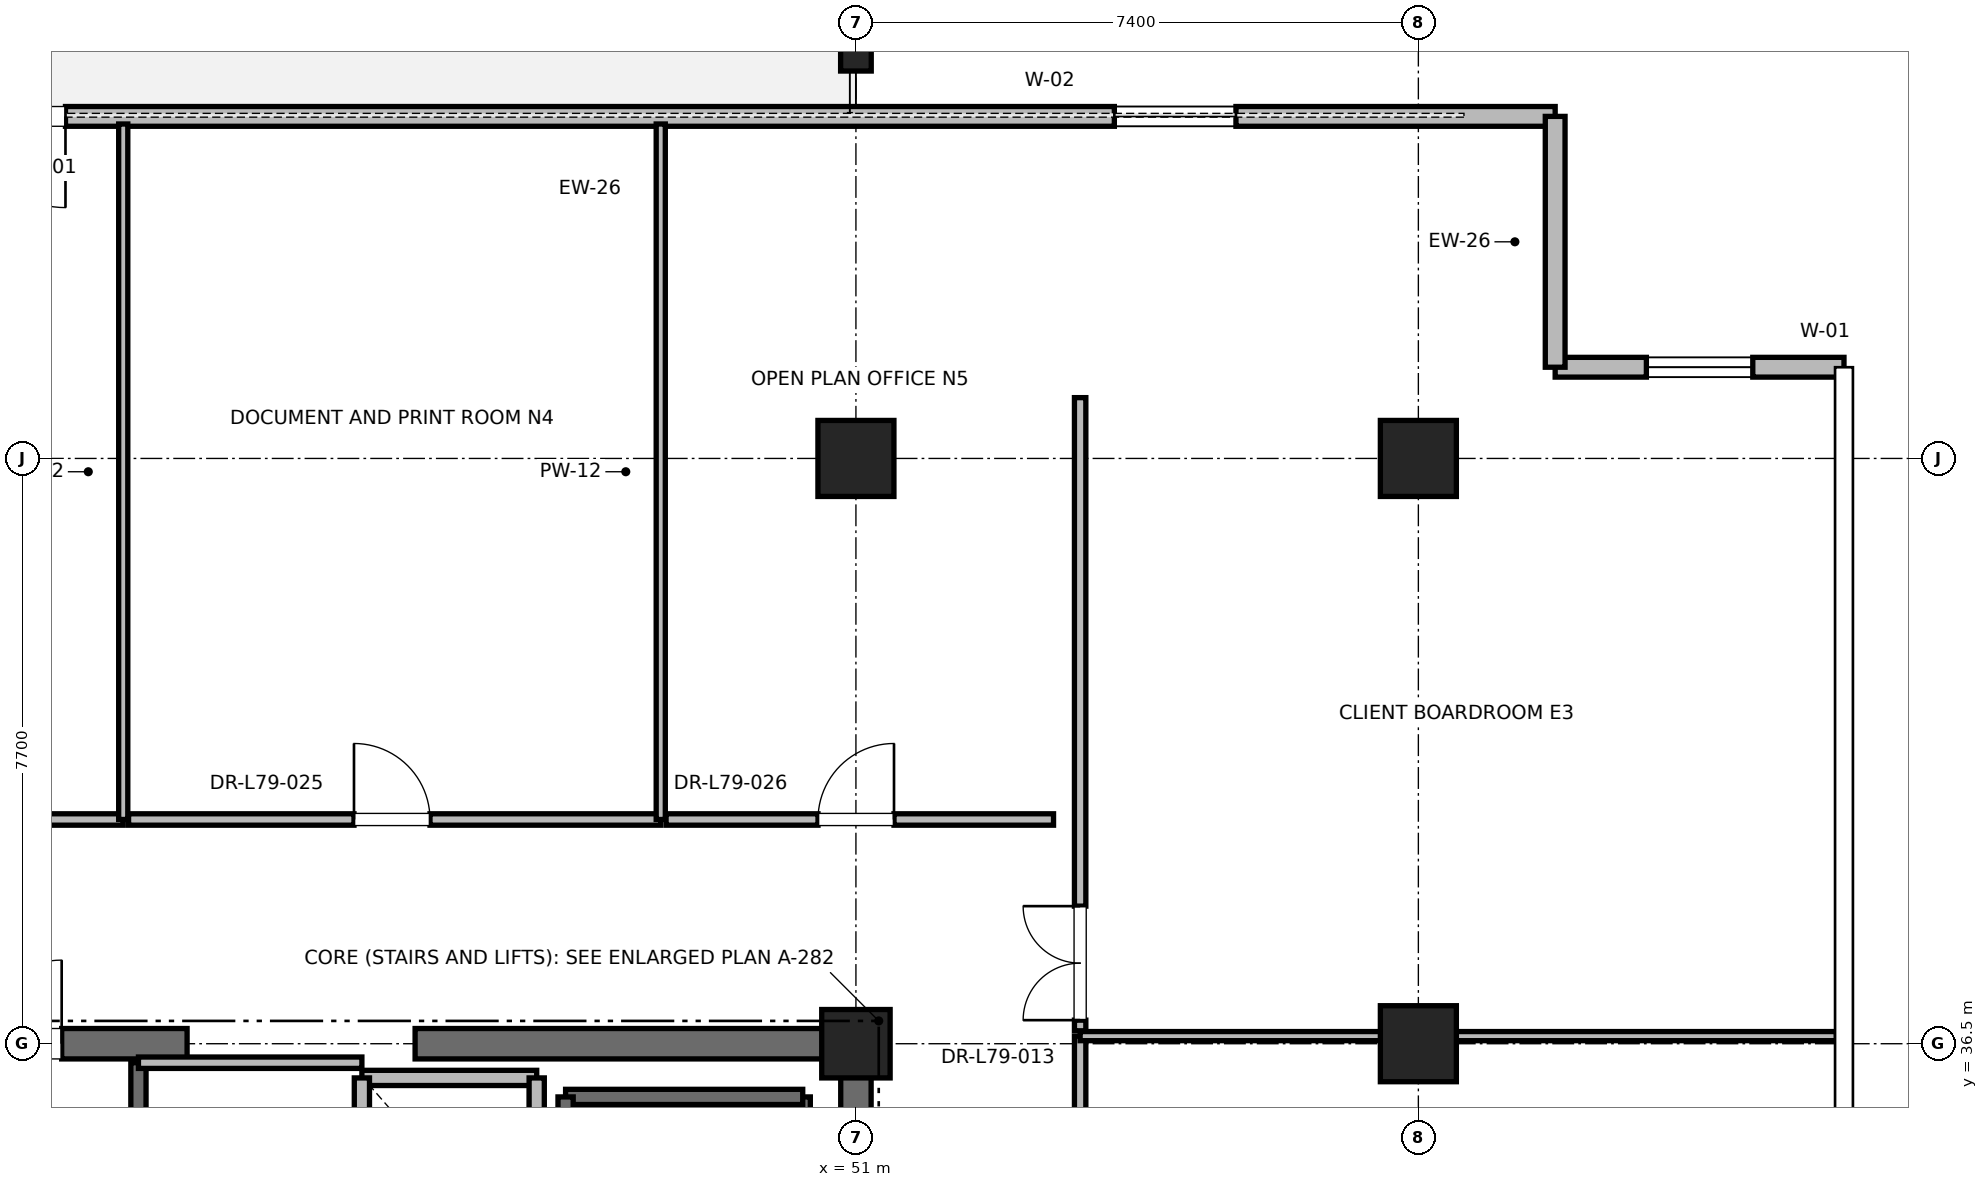
"""IFC4 building model, lengths in metres.
Left out: names, types, materials, properties, quantities, classifications, styles, units other than length and angle.
Written with IfcOpenShell. Run it as: python <this file> out.ifc"""

import sys

from ifc_helpers import new_model, si_unit, direction, frame, frame_2d, origin, origin_2d, place, context, subcontext, project, spatial, rectangle, i_section, extrude, element, fill, save


model = new_model("IFC4")
c1 = context("Model", 3, precision=1e-05, world=origin(), true_north=direction((0.0, 1.0)))
c2 = subcontext(c1, "Body", "Model", "MODEL_VIEW")
j1 = project(units=[si_unit("LENGTHUNIT", "METRE"), si_unit("PLANEANGLEUNIT", "RADIAN")], contexts=[c1])
p1 = place(None, origin())
s1 = spatial("IfcSite", under=j1, at=p1, CompositionType="ELEMENT")
p2 = place(p1, origin())
s2 = spatial("IfcBuilding", under=s1, at=p2, CompositionType="ELEMENT")
p3 = place(p2, frame((0.0, 0.0, 338.8)))
s3 = spatial("IfcBuildingStorey", under=s2, at=p3, CompositionType="ELEMENT", Elevation=338.8)
for number, where, z_axis, x_axis in (
    (1, (51.0, 44.2, 0.0), (0.0, 0.0, 1.0), (1.0, 0.0, 0.0)),
    (2, (58.4, 36.5, 0.0), (0.0, 0.0, 1.0), (1.0, 0.0, 0.0)),
    (3, (58.4, 44.2, 0.0), (0.0, 0.0, 1.0), (1.0, 0.0, 0.0)),
):
    element("IfcColumn", number, at=place(p3, frame(where, z_axis=z_axis, x_axis=x_axis)), inside=s3, PredefinedType="COLUMN", context=c2, shape_type="SweptSolid", body=[
        extrude(rectangle(XDim=1.0, YDim=1.0, at=origin_2d()), origin(), (0.0, 0.0, 1.0), 4.0),
    ])
p4 = place(p3, frame((51.0, 49.5, 0.0), z_axis=(0.0, 0.0, 1.0), x_axis=(1.0, 0.0, 0.0)))
e4 = element("IfcColumn", 4, at=p4, inside=s3, PredefinedType="COLUMN", context=c2, shape_type="SweptSolid", body=[
    extrude(i_section(OverallWidth=0.403, OverallDepth=0.406, WebThickness=0.027, FlangeThickness=0.043, FilletRadius=0.015, at=origin_2d()), origin(), (0.0, 0.0, 1.0), 4.0),
])
p5 = place(p3, frame((51.0, 36.5, 0.0), z_axis=(0.0, 0.0, 1.0), x_axis=(1.0, 0.0, 0.0)))
e5 = element("IfcColumn", 5, at=p5, inside=s3, PredefinedType="PILASTER", context=c2, shape_type="SweptSolid", body=[
    extrude(rectangle(XDim=0.9, YDim=0.9, at=origin_2d()), origin(), (0.0, 0.0, 1.0), 4.0),
])
p6 = place(p3, frame((37.8, 36.5, 0.0), z_axis=(0.0, 0.0, 1.0), x_axis=(1.0, 0.0, 0.0)))
e6 = element("IfcWall", 6, at=p6, inside=s3, PredefinedType="SHEAR", context=c2, shape_type="SweptSolid", body=[
    extrude(rectangle(XDim=4.4, YDim=0.4, at=frame_2d((2.2, 0.0))), origin(), (0.0, 0.0, 1.0), 3.7),
])
p7 = place(p6, frame((1.65, 0.0, 0.0)))
e7 = element("IfcOpeningElement", 7, at=p7, cuts=e6, PredefinedType="OPENING", context=c2, shape_type="SweptSolid", body=[
    extrude(rectangle(XDim=1.1, YDim=2.15, at=frame_2d((0.55, 1.075))), frame((0.0, 0.2, 0.0), z_axis=(0.0, -1.0, 0.0), x_axis=(1.0, 0.0, 0.0)), (0.0, 0.0, 1.0), 0.4),
])
p8 = place(p3, frame((45.2, 36.5, 0.0), z_axis=(0.0, 0.0, 1.0), x_axis=(1.0, 0.0, 0.0)))
e8 = element("IfcWall", 8, at=p8, inside=s3, PredefinedType="SHEAR", context=c2, shape_type="SweptSolid", body=[
    extrude(rectangle(XDim=5.8, YDim=0.4, at=frame_2d((2.9, 0.0))), origin(), (0.0, 0.0, 1.0), 3.7),
])
p9 = place(p3, frame((51.0, 27.7, 0.0), z_axis=(0.0, 0.0, 1.0), x_axis=(0.0, 1.0, 0.0)))
e9 = element("IfcWall", 9, at=p9, inside=s3, PredefinedType="SHEAR", context=c2, shape_type="SweptSolid", body=[
    extrude(rectangle(XDim=8.8, YDim=0.4, at=frame_2d((4.4, 0.0))), origin(), (0.0, 0.0, 1.0), 3.7),
])
p10 = place(p3, frame((60.2, 48.7, 0.0), z_axis=(0.0, 0.0, 1.0), x_axis=(-1.0, 0.0, 0.0)))
e10 = element("IfcWall", 10, at=p10, inside=s3, PredefinedType="PARAPET", context=c2, shape_type="SweptSolid", body=[
    extrude(rectangle(XDim=40.4, YDim=0.26, at=frame_2d((20.2, 0.0))), origin(), (0.0, 0.0, 1.0), 3.7),
])
p11 = place(p10, frame((4.2, 0.0, 0.85)))
e11 = element("IfcOpeningElement", 11, at=p11, cuts=e10, PredefinedType="OPENING", context=c2, shape_type="SweptSolid", body=[
    extrude(rectangle(XDim=1.6, YDim=2.1, at=frame_2d((0.8, 1.05))), frame((0.0, 0.13, 0.0), z_axis=(0.0, -1.0, 0.0), x_axis=(1.0, 0.0, 0.0)), (0.0, 0.0, 1.0), 0.26),
])
p12 = place(p10, frame((19.6, 0.0, 0.0)))
e12 = element("IfcOpeningElement", 12, at=p12, cuts=e10, PredefinedType="OPENING", context=c2, shape_type="SweptSolid", body=[
    extrude(rectangle(XDim=1.2, YDim=2.2, at=frame_2d((0.6, 1.1))), frame((0.0, 0.13, 0.0), z_axis=(0.0, -1.0, 0.0), x_axis=(1.0, 0.0, 0.0)), (0.0, 0.0, 1.0), 0.26),
])
p13 = place(p10, frame((34.6, 0.0, 0.85)))
e13 = element("IfcOpeningElement", 13, at=p13, cuts=e10, PredefinedType="OPENING", context=c2, shape_type="SweptSolid", body=[
    extrude(rectangle(XDim=1.6, YDim=2.1, at=frame_2d((0.8, 1.05))), frame((0.0, 0.13, 0.0), z_axis=(0.0, -1.0, 0.0), x_axis=(1.0, 0.0, 0.0)), (0.0, 0.0, 1.0), 0.26),
])
p14 = place(p3, frame((64.0, 45.4, 0.0), z_axis=(0.0, 0.0, 1.0), x_axis=(-1.0, 0.0, 0.0)))
e14 = element("IfcWall", 14, at=p14, inside=s3, PredefinedType="PARAPET", context=c2, shape_type="SweptSolid", body=[
    extrude(rectangle(XDim=3.8, YDim=0.26, at=frame_2d((1.9, 0.0))), origin(), (0.0, 0.0, 1.0), 3.7),
])
p15 = place(p14, frame((1.2, 0.0, 0.85)))
e15 = element("IfcOpeningElement", 15, at=p15, cuts=e14, PredefinedType="OPENING", context=c2, shape_type="SweptSolid", body=[
    extrude(rectangle(XDim=1.4, YDim=2.0, at=frame_2d((0.7, 1.0))), frame((0.0, 0.13, 0.0), z_axis=(0.0, -1.0, 0.0), x_axis=(1.0, 0.0, 0.0)), (0.0, 0.0, 1.0), 0.26),
])
p16 = place(p3, frame((60.2, 45.4, 0.0), z_axis=(0.0, 0.0, 1.0), x_axis=(0.0, 1.0, 0.0)))
e16 = element("IfcWall", 16, at=p16, inside=s3, PredefinedType="PARAPET", context=c2, shape_type="SweptSolid", body=[
    extrude(rectangle(XDim=3.3, YDim=0.26, at=frame_2d((1.65, 0.0))), origin(), (0.0, 0.0, 1.0), 3.7),
])
p17 = place(p3, frame((50.3, 27.65, 0.0), z_axis=(0.0, 0.0, 1.0), x_axis=(0.0, 1.0, 0.0)))
e17 = element("IfcWall", 17, at=p17, inside=s3, PredefinedType="SOLIDWALL", context=c2, shape_type="SweptSolid", body=[
    extrude(rectangle(XDim=8.15, YDim=0.2, at=frame_2d((4.075, 0.0))), origin(), (0.0, 0.0, 1.0), 3.7),
])
p18 = place(p3, frame((47.18, 35.8, 0.0), z_axis=(0.0, 0.0, 1.0), x_axis=(1.0, 0.0, 0.0)))
e18 = element("IfcWall", 18, at=p18, inside=s3, PredefinedType="SOLIDWALL", context=c2, shape_type="SweptSolid", body=[
    extrude(rectangle(XDim=3.12, YDim=0.2, at=frame_2d((1.56, 0.0))), origin(), (0.0, 0.0, 1.0), 3.7),
])
p19 = place(p3, frame((47.18, 27.62, 0.0), z_axis=(0.0, 0.0, 1.0), x_axis=(0.0, 1.0, 0.0)))
e19 = element("IfcWall", 19, at=p19, inside=s3, PredefinedType="SOLIDWALL", context=c2, shape_type="SweptSolid", body=[
    extrude(rectangle(XDim=8.18, YDim=0.2, at=frame_2d((4.09, 0.0))), origin(), (0.0, 0.0, 1.0), 3.7),
])
p20 = place(p3, frame((41.56, 27.68, 0.0), z_axis=(0.0, 0.0, 1.0), x_axis=(0.0, 1.0, 0.0)))
e20 = element("IfcWall", 20, at=p20, inside=s3, PredefinedType="SOLIDWALL", context=c2, shape_type="SweptSolid", body=[
    extrude(rectangle(XDim=8.57, YDim=0.2, at=frame_2d((4.285, 0.0))), origin(), (0.0, 0.0, 1.0), 3.7),
])
p21 = place(p3, frame((46.8, 36.05, 0.0), z_axis=(0.0, 0.0, 1.0), x_axis=(-1.0, 0.0, 0.0)))
e21 = element("IfcWall", 21, at=p21, inside=s3, PredefinedType="SOLIDWALL", context=c2, shape_type="SweptSolid", body=[
    extrude(rectangle(XDim=2.3, YDim=0.2, at=frame_2d((1.15, 0.0))), origin(), (0.0, 0.0, 1.0), 2.78),
])
p22 = place(p3, frame((44.5, 36.05, 0.0), z_axis=(0.0, 0.0, 1.0), x_axis=(0.0, -1.0, 0.0)))
e22 = element("IfcWall", 22, at=p22, inside=s3, PredefinedType="SOLIDWALL", context=c2, shape_type="SweptSolid", body=[
    extrude(rectangle(XDim=2.6, YDim=0.2, at=frame_2d((1.3, 0.0))), origin(), (0.0, 0.0, 1.0), 2.78),
])
p23 = place(p3, frame((46.8, 33.45, 0.0), z_axis=(0.0, 0.0, 1.0), x_axis=(0.0, 1.0, 0.0)))
e23 = element("IfcWall", 23, at=p23, inside=s3, PredefinedType="SOLIDWALL", context=c2, shape_type="SweptSolid", body=[
    extrude(rectangle(XDim=2.6, YDim=0.2, at=frame_2d((1.3, 0.0))), origin(), (0.0, 0.0, 1.0), 3.7),
])
p24 = place(p3, frame((41.56, 36.25, 0.0), z_axis=(0.0, 0.0, 1.0), x_axis=(1.0, 0.0, 0.0)))
e24 = element("IfcWall", 24, at=p24, inside=s3, PredefinedType="PARTITIONING", context=c2, shape_type="SweptSolid", body=[
    extrude(rectangle(XDim=2.94, YDim=0.15, at=frame_2d((1.47, 0.0))), origin(), (0.0, 0.0, 1.0), 2.78),
])
p25 = place(p3, frame((35.174, 39.45, 0.0), z_axis=(0.0, 0.0, 1.0), x_axis=(1.0, 0.0, 0.0)))
e25 = element("IfcWall", 25, at=p25, inside=s3, PredefinedType="PARTITIONING", context=c2, shape_type="SweptSolid", body=[
    extrude(rectangle(XDim=6.186, YDim=0.15, at=frame_2d((3.093, 0.0))), origin(), (0.0, 0.0, 1.0), 2.85),
])
p26 = place(p25, frame((2.558, 0.0, 0.0)))
e26 = element("IfcOpeningElement", 26, at=p26, cuts=e25, PredefinedType="OPENING", context=c2, shape_type="SweptSolid", body=[
    extrude(rectangle(XDim=1.0, YDim=2.15, at=frame_2d((0.5, 1.075))), frame((0.0, 0.075, 0.0), z_axis=(0.0, -1.0, 0.0), x_axis=(1.0, 0.0, 0.0)), (0.0, 0.0, 1.0), 0.15),
])
p27 = place(p3, frame((41.36, 39.45, 0.0), z_axis=(0.0, 0.0, 1.0), x_axis=(0.0, 1.0, 0.0)))
e27 = element("IfcWall", 27, at=p27, inside=s3, PredefinedType="PARTITIONING", context=c2, shape_type="SweptSolid", body=[
    extrude(rectangle(XDim=9.15, YDim=0.12, at=frame_2d((4.575, 0.0))), origin(), (0.0, 0.0, 1.0), 2.33),
])
p28 = place(p3, frame((41.43, 39.45, 0.0), z_axis=(0.0, 0.0, 1.0), x_axis=(1.0, 0.0, 0.0)))
e28 = element("IfcWall", 28, at=p28, inside=s3, PredefinedType="PARTITIONING", context=c2, shape_type="SweptSolid", body=[
    extrude(rectangle(XDim=7.002, YDim=0.15, at=frame_2d((3.501, 0.0))), origin(), (0.0, 0.0, 1.0), 2.85),
])
p29 = place(p28, frame((2.966, 0.0, 0.0)))
e29 = element("IfcOpeningElement", 29, at=p29, cuts=e28, PredefinedType="OPENING", context=c2, shape_type="SweptSolid", body=[
    extrude(rectangle(XDim=1.0, YDim=2.15, at=frame_2d((0.5, 1.075))), frame((0.0, 0.075, 0.0), z_axis=(0.0, -1.0, 0.0), x_axis=(1.0, 0.0, 0.0)), (0.0, 0.0, 1.0), 0.15),
])
p30 = place(p3, frame((48.432, 39.45, 0.0), z_axis=(0.0, 0.0, 1.0), x_axis=(0.0, 1.0, 0.0)))
e30 = element("IfcWall", 30, at=p30, inside=s3, PredefinedType="PARTITIONING", context=c2, shape_type="SweptSolid", body=[
    extrude(rectangle(XDim=9.15, YDim=0.12, at=frame_2d((4.575, 0.0))), origin(), (0.0, 0.0, 1.0), 2.33),
])
p31 = place(p3, frame((48.502, 39.45, 0.0), z_axis=(0.0, 0.0, 1.0), x_axis=(1.0, 0.0, 0.0)))
e31 = element("IfcWall", 31, at=p31, inside=s3, PredefinedType="PARTITIONING", context=c2, shape_type="SweptSolid", body=[
    extrude(rectangle(XDim=5.098, YDim=0.15, at=frame_2d((2.549, 0.0))), origin(), (0.0, 0.0, 1.0), 2.753),
])
p32 = place(p31, frame((1.999, 0.0, 0.0)))
e32 = element("IfcOpeningElement", 32, at=p32, cuts=e31, PredefinedType="OPENING", context=c2, shape_type="SweptSolid", body=[
    extrude(rectangle(XDim=1.0, YDim=2.15, at=frame_2d((0.5, 1.075))), frame((0.0, 0.075, 0.0), z_axis=(0.0, -1.0, 0.0), x_axis=(1.0, 0.0, 0.0)), (0.0, 0.0, 1.0), 0.15),
])
p33 = place(p3, frame((53.95, 23.37, 0.0), z_axis=(0.0, 0.0, 1.0), x_axis=(0.0, 1.0, 0.0)))
e33 = element("IfcWall", 33, at=p33, inside=s3, PredefinedType="PARTITIONING", context=c2, shape_type="SweptSolid", body=[
    extrude(rectangle(XDim=13.23, YDim=0.15, at=frame_2d((6.615, 0.0))), origin(), (0.0, 0.0, 1.0), 2.753),
])
p34 = place(p33, frame((5.99, 0.0, 0.0)))
e34 = element("IfcOpeningElement", 34, at=p34, cuts=e33, PredefinedType="OPENING", context=c2, shape_type="SweptSolid", body=[
    extrude(rectangle(XDim=1.05, YDim=2.2, at=frame_2d((0.525, 1.1))), frame((0.0, 0.075, 0.0), z_axis=(0.0, -1.0, 0.0), x_axis=(1.0, 0.0, 0.0)), (0.0, 0.0, 1.0), 0.15),
])
p35 = place(p3, frame((53.95, 36.6, 0.0), z_axis=(0.0, 0.0, 1.0), x_axis=(1.0, 0.0, 0.0)))
e35 = element("IfcWall", 35, at=p35, inside=s3, PredefinedType="PARTITIONING", context=c2, shape_type="SweptSolid", body=[
    extrude(rectangle(XDim=9.95, YDim=0.12, at=frame_2d((4.975, 0.0))), origin(), (0.0, 0.0, 1.0), 2.753),
])
p36 = place(p3, frame((53.95, 36.67, 0.0), z_axis=(0.0, 0.0, 1.0), x_axis=(0.0, 1.0, 0.0)))
e36 = element("IfcWall", 36, at=p36, inside=s3, PredefinedType="PARTITIONING", context=c2, shape_type="SweptSolid", body=[
    extrude(rectangle(XDim=8.33, YDim=0.15, at=frame_2d((4.165, 0.0))), origin(), (0.0, 0.0, 1.0), 2.753),
])
p37 = place(p36, frame((0.14, 0.0, 0.0)))
e37 = element("IfcOpeningElement", 37, at=p37, cuts=e36, PredefinedType="OPENING", context=c2, shape_type="SweptSolid", body=[
    extrude(rectangle(XDim=1.5, YDim=2.25, at=frame_2d((0.75, 1.125))), frame((0.0, 0.075, 0.0), z_axis=(0.0, -1.0, 0.0), x_axis=(1.0, 0.0, 0.0)), (0.0, 0.0, 1.0), 0.15),
])
p38 = place(p11, origin())
e38 = element("IfcWindow", 38, at=p38, inside=s3, PartitioningType="SINGLE_PANEL", PredefinedType="WINDOW", context=c2, shape_type="SweptSolid", body=[
    extrude(rectangle(XDim=1.6, YDim=2.1, at=frame_2d((0.8, 1.05))), frame((0.0, 0.03, 0.0), z_axis=(0.0, -1.0, 0.0), x_axis=(1.0, 0.0, 0.0)), (0.0, 0.0, 1.0), 0.06),
])
fill(e11, e38)
p39 = place(p12, origin())
e39 = element("IfcDoor", 39, at=p39, inside=s3, OperationType="SINGLE_SWING_LEFT", PredefinedType="DOOR", context=c2, shape_type="SweptSolid", body=[
    extrude(rectangle(XDim=1.2, YDim=2.2, at=frame_2d((0.6, 1.1))), frame((0.0, 0.025, 0.0), z_axis=(0.0, -1.0, 0.0), x_axis=(1.0, 0.0, 0.0)), (0.0, 0.0, 1.0), 0.05),
])
fill(e12, e39)
p40 = place(p15, origin())
e40 = element("IfcWindow", 40, at=p40, inside=s3, PartitioningType="SINGLE_PANEL", PredefinedType="WINDOW", context=c2, shape_type="SweptSolid", body=[
    extrude(rectangle(XDim=1.4, YDim=2.0, at=frame_2d((0.7, 1.0))), frame((0.0, 0.03, 0.0), z_axis=(0.0, -1.0, 0.0), x_axis=(1.0, 0.0, 0.0)), (0.0, 0.0, 1.0), 0.06),
])
fill(e15, e40)
p41 = place(p7, origin())
e41 = element("IfcDoor", 41, at=p41, inside=s3, OperationType="SINGLE_SWING_RIGHT", PredefinedType="DOOR", context=c2, shape_type="SweptSolid", body=[
    extrude(rectangle(XDim=1.1, YDim=2.15, at=frame_2d((0.55, 1.075))), frame((0.0, 0.025, 0.0), z_axis=(0.0, -1.0, 0.0), x_axis=(1.0, 0.0, 0.0)), (0.0, 0.0, 1.0), 0.05),
])
fill(e7, e41)
p42 = place(p29, origin())
e42 = element("IfcDoor", 42, at=p42, inside=s3, OperationType="SINGLE_SWING_LEFT", PredefinedType="DOOR", context=c2, shape_type="SweptSolid", body=[
    extrude(rectangle(XDim=1.0, YDim=2.15, at=frame_2d((0.5, 1.075))), frame((0.0, 0.025, 0.0), z_axis=(0.0, -1.0, 0.0), x_axis=(1.0, 0.0, 0.0)), (0.0, 0.0, 1.0), 0.05),
])
fill(e29, e42)
p43 = place(p32, origin())
e43 = element("IfcDoor", 43, at=p43, inside=s3, OperationType="SINGLE_SWING_RIGHT", PredefinedType="DOOR", context=c2, shape_type="SweptSolid", body=[
    extrude(rectangle(XDim=1.0, YDim=2.15, at=frame_2d((0.5, 1.075))), frame((0.0, 0.025, 0.0), z_axis=(0.0, -1.0, 0.0), x_axis=(1.0, 0.0, 0.0)), (0.0, 0.0, 1.0), 0.05),
])
fill(e32, e43)
p44 = place(p37, origin())
e44 = element("IfcDoor", 44, at=p44, inside=s3, OperationType="DOUBLE_DOOR_SINGLE_SWING", PredefinedType="DOOR", context=c2, shape_type="SweptSolid", body=[
    extrude(rectangle(XDim=1.5, YDim=2.25, at=frame_2d((0.75, 1.125))), frame((0.0, 0.025, 0.0), z_axis=(0.0, -1.0, 0.0), x_axis=(1.0, 0.0, 0.0)), (0.0, 0.0, 1.0), 0.05),
])
fill(e37, e44)
save(model, sys.argv[1])
